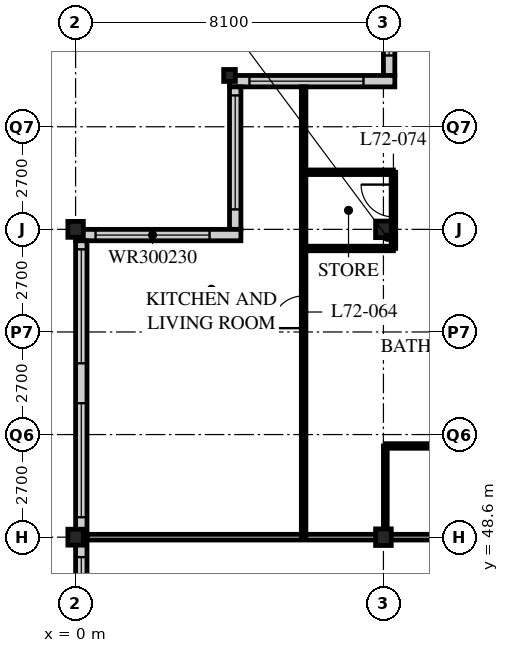
"""IFC4 building model, lengths in metres.
Left out: names, types, materials, properties, quantities, classifications, styles, units other than length and angle.
Written with IfcOpenShell. Run it as: python <this file> out.ifc"""

import sys

from ifc_helpers import new_model, si_unit, direction, frame, frame_2d, origin, origin_2d, place, context, subcontext, project, spatial, rectangle, i_section, extrude, element, fill, save


model = new_model("IFC4")
c1 = context("Model", 3, precision=1e-05, world=origin(), true_north=direction((0.0, 1.0)))
c2 = subcontext(c1, "Body", "Model", "MODEL_VIEW")
j1 = project(units=[si_unit("LENGTHUNIT", "METRE"), si_unit("PLANEANGLEUNIT", "RADIAN")], contexts=[c1])
p1 = place(None, origin())
s1 = spatial("IfcSite", under=j1, at=p1, CompositionType="ELEMENT")
p2 = place(p1, origin())
s2 = spatial("IfcBuilding", under=s1, at=p2, CompositionType="ELEMENT")
p3 = place(p2, frame((0.0, 0.0, 281.4)))
s3 = spatial("IfcBuildingStorey", under=s2, at=p3, CompositionType="ELEMENT", Elevation=281.4)
for number, where, z_axis, x_axis in (
    (1, (0.0, 48.6, 0.0), (0.0, 0.0, 1.0), (1.0, 0.0, 0.0)),
    (2, (0.0, 56.7, 0.0), (0.0, 0.0, 1.0), (1.0, 0.0, 0.0)),
):
    element("IfcColumn", number, at=place(p3, frame(where, z_axis=z_axis, x_axis=x_axis)), inside=s3, PredefinedType="COLUMN", context=c2, shape_type="SweptSolid", body=[
        extrude(i_section(OverallWidth=0.407, OverallDepth=0.419, WebThickness=0.031, FlangeThickness=0.049, FilletRadius=0.015, at=origin_2d()), origin(), (0.0, 0.0, 1.0), 3.9),
    ])
p4 = place(p3, frame((4.05, 60.75, 0.0), z_axis=(0.0, 0.0, 1.0), x_axis=(1.0, 0.0, 0.0)))
e3 = element("IfcColumn", 3, at=p4, inside=s3, PredefinedType="COLUMN", context=c2, shape_type="SweptSolid", body=[
    extrude(i_section(OverallWidth=0.307, OverallDepth=0.314, WebThickness=0.012, FlangeThickness=0.019, FilletRadius=0.015, at=origin_2d()), origin(), (0.0, 0.0, 1.0), 3.9),
])
for number, where, z_axis, x_axis in (
    (4, (8.1, 48.6, 0.0), (0.0, 0.0, 1.0), (1.0, 0.0, 0.0)),
    (5, (8.1, 56.7, 0.0), (0.0, 0.0, 1.0), (1.0, 0.0, 0.0)),
):
    element("IfcColumn", number, at=place(p3, frame(where, z_axis=z_axis, x_axis=x_axis)), inside=s3, PredefinedType="COLUMN", context=c2, shape_type="SweptSolid", body=[
        extrude(i_section(OverallWidth=0.412, OverallDepth=0.437, WebThickness=0.036, FlangeThickness=0.058, FilletRadius=0.015, at=origin_2d()), origin(), (0.0, 0.0, 1.0), 3.9),
    ])
p5 = place(p3, frame((8.25, 64.5, 0.0), z_axis=(0.0, 0.0, 1.0), x_axis=(0.0, -1.0, 0.0)))
e6 = element("IfcWall", 6, at=p5, inside=s3, PredefinedType="SOLIDWALL", context=c2, shape_type="SweptSolid", body=[
    extrude(rectangle(XDim=3.75, YDim=0.3, at=frame_2d((1.875, 0.0))), origin(), (0.0, 0.0, 1.0), 3.69),
])
p6 = place(p5, frame((0.225, 0.0, 0.6)))
e7 = element("IfcOpeningElement", 7, at=p6, cuts=e6, PredefinedType="OPENING", context=c2, shape_type="SweptSolid", body=[
    extrude(rectangle(XDim=3.0, YDim=2.3, at=frame_2d((1.5, 1.15))), frame((0.0, 0.16, 0.0), z_axis=(0.0, -1.0, 0.0), x_axis=(1.0, 0.0, 0.0)), (0.0, 0.0, 1.0), 0.32),
])
p7 = place(p3, frame((8.4, 60.6, 0.0), z_axis=(0.0, 0.0, 1.0), x_axis=(-1.0, 0.0, 0.0)))
e8 = element("IfcWall", 8, at=p7, inside=s3, PredefinedType="SOLIDWALL", context=c2, shape_type="SweptSolid", body=[
    extrude(rectangle(XDim=4.35, YDim=0.3, at=frame_2d((2.175, 0.0))), origin(), (0.0, 0.0, 1.0), 3.69),
])
p8 = place(p7, frame((0.825, 0.0, 0.6)))
e9 = element("IfcOpeningElement", 9, at=p8, cuts=e8, PredefinedType="OPENING", context=c2, shape_type="SweptSolid", body=[
    extrude(rectangle(XDim=3.0, YDim=2.3, at=frame_2d((1.5, 1.15))), frame((0.0, 0.16, 0.0), z_axis=(0.0, -1.0, 0.0), x_axis=(1.0, 0.0, 0.0)), (0.0, 0.0, 1.0), 0.32),
])
p9 = place(p3, frame((4.2, 60.45, 0.0), z_axis=(0.0, 0.0, 1.0), x_axis=(0.0, -1.0, 0.0)))
e10 = element("IfcWall", 10, at=p9, inside=s3, PredefinedType="SOLIDWALL", context=c2, shape_type="SweptSolid", body=[
    extrude(rectangle(XDim=3.75, YDim=0.3, at=frame_2d((1.875, 0.0))), origin(), (0.0, 0.0, 1.0), 3.69),
])
p10 = place(p9, frame((0.225, 0.0, 0.6)))
e11 = element("IfcOpeningElement", 11, at=p10, cuts=e10, PredefinedType="OPENING", context=c2, shape_type="SweptSolid", body=[
    extrude(rectangle(XDim=3.0, YDim=2.3, at=frame_2d((1.5, 1.15))), frame((0.0, 0.16, 0.0), z_axis=(0.0, -1.0, 0.0), x_axis=(1.0, 0.0, 0.0)), (0.0, 0.0, 1.0), 0.32),
])
p11 = place(p3, frame((4.35, 56.55, 0.0), z_axis=(0.0, 0.0, 1.0), x_axis=(-1.0, 0.0, 0.0)))
e12 = element("IfcWall", 12, at=p11, inside=s3, PredefinedType="SOLIDWALL", context=c2, shape_type="SweptSolid", body=[
    extrude(rectangle(XDim=4.35, YDim=0.3, at=frame_2d((2.175, 0.0))), origin(), (0.0, 0.0, 1.0), 3.69),
])
p12 = place(p11, frame((0.825, 0.0, 0.6)))
e13 = element("IfcOpeningElement", 13, at=p12, cuts=e12, PredefinedType="OPENING", context=c2, shape_type="SweptSolid", body=[
    extrude(rectangle(XDim=3.0, YDim=2.3, at=frame_2d((1.5, 1.15))), frame((0.0, 0.16, 0.0), z_axis=(0.0, -1.0, 0.0), x_axis=(1.0, 0.0, 0.0)), (0.0, 0.0, 1.0), 0.32),
])
p13 = place(p3, frame((0.15, 56.4, 0.0), z_axis=(0.0, 0.0, 1.0), x_axis=(0.0, -1.0, 0.0)))
e14 = element("IfcWall", 14, at=p13, inside=s3, PredefinedType="SOLIDWALL", context=c2, shape_type="SweptSolid", body=[
    extrude(rectangle(XDim=32.1, YDim=0.3, at=frame_2d((16.05, 0.0))), origin(), (0.0, 0.0, 1.0), 3.69),
])
p14 = place(p13, frame((0.225, 0.0, 0.6)))
e15 = element("IfcOpeningElement", 15, at=p14, cuts=e14, PredefinedType="OPENING", context=c2, shape_type="SweptSolid", body=[
    extrude(rectangle(XDim=3.0, YDim=2.4, at=frame_2d((1.5, 1.2))), frame((0.0, 0.16, 0.0), z_axis=(0.0, -1.0, 0.0), x_axis=(1.0, 0.0, 0.0)), (0.0, 0.0, 1.0), 0.32),
])
p15 = place(p13, frame((4.275, 0.0, 0.6)))
e16 = element("IfcOpeningElement", 16, at=p15, cuts=e14, PredefinedType="OPENING", context=c2, shape_type="SweptSolid", body=[
    extrude(rectangle(XDim=3.0, YDim=2.4, at=frame_2d((1.5, 1.2))), frame((0.0, 0.16, 0.0), z_axis=(0.0, -1.0, 0.0), x_axis=(1.0, 0.0, 0.0)), (0.0, 0.0, 1.0), 0.32),
])
p16 = place(p13, frame((8.325, 0.0, 0.6)))
e17 = element("IfcOpeningElement", 17, at=p16, cuts=e14, PredefinedType="OPENING", context=c2, shape_type="SweptSolid", body=[
    extrude(rectangle(XDim=3.0, YDim=2.4, at=frame_2d((1.5, 1.2))), frame((0.0, 0.16, 0.0), z_axis=(0.0, -1.0, 0.0), x_axis=(1.0, 0.0, 0.0)), (0.0, 0.0, 1.0), 0.32),
])
p17 = place(p13, frame((12.375, 0.0, 0.6)))
e18 = element("IfcOpeningElement", 18, at=p17, cuts=e14, PredefinedType="OPENING", context=c2, shape_type="SweptSolid", body=[
    extrude(rectangle(XDim=3.0, YDim=2.4, at=frame_2d((1.5, 1.2))), frame((0.0, 0.16, 0.0), z_axis=(0.0, -1.0, 0.0), x_axis=(1.0, 0.0, 0.0)), (0.0, 0.0, 1.0), 0.32),
])
p18 = place(p13, frame((16.425, 0.0, 0.6)))
e19 = element("IfcOpeningElement", 19, at=p18, cuts=e14, PredefinedType="OPENING", context=c2, shape_type="SweptSolid", body=[
    extrude(rectangle(XDim=3.0, YDim=2.4, at=frame_2d((1.5, 1.2))), frame((0.0, 0.16, 0.0), z_axis=(0.0, -1.0, 0.0), x_axis=(1.0, 0.0, 0.0)), (0.0, 0.0, 1.0), 0.32),
])
p19 = place(p13, frame((20.475, 0.0, 0.6)))
e20 = element("IfcOpeningElement", 20, at=p19, cuts=e14, PredefinedType="OPENING", context=c2, shape_type="SweptSolid", body=[
    extrude(rectangle(XDim=3.0, YDim=2.4, at=frame_2d((1.5, 1.2))), frame((0.0, 0.16, 0.0), z_axis=(0.0, -1.0, 0.0), x_axis=(1.0, 0.0, 0.0)), (0.0, 0.0, 1.0), 0.32),
])
p20 = place(p13, frame((24.525, 0.0, 0.6)))
e21 = element("IfcOpeningElement", 21, at=p20, cuts=e14, PredefinedType="OPENING", context=c2, shape_type="SweptSolid", body=[
    extrude(rectangle(XDim=3.0, YDim=2.4, at=frame_2d((1.5, 1.2))), frame((0.0, 0.16, 0.0), z_axis=(0.0, -1.0, 0.0), x_axis=(1.0, 0.0, 0.0)), (0.0, 0.0, 1.0), 0.32),
])
p21 = place(p13, frame((28.575, 0.0, 0.6)))
e22 = element("IfcOpeningElement", 22, at=p21, cuts=e14, PredefinedType="OPENING", context=c2, shape_type="SweptSolid", body=[
    extrude(rectangle(XDim=3.0, YDim=2.4, at=frame_2d((1.5, 1.2))), frame((0.0, 0.16, 0.0), z_axis=(0.0, -1.0, 0.0), x_axis=(1.0, 0.0, 0.0)), (0.0, 0.0, 1.0), 0.32),
])
p22 = place(p3, frame((8.15, 48.6, 0.0), z_axis=(0.0, 0.0, 1.0), x_axis=(0.0, 1.0, 0.0)))
e23 = element("IfcWall", 23, at=p22, inside=s3, PredefinedType="PARTITIONING", context=c2, shape_type="SweptSolid", body=[
    extrude(rectangle(XDim=2.4, YDim=0.1, at=frame_2d((1.2, 0.0))), origin(), (0.0, 0.0, 1.0), 3.078),
])
p23 = place(p3, frame((8.15, 51.0, 0.0), z_axis=(0.0, 0.0, 1.0), x_axis=(1.0, 0.0, 0.0)))
e24 = element("IfcWall", 24, at=p23, inside=s3, PredefinedType="PARTITIONING", context=c2, shape_type="SweptSolid", body=[
    extrude(rectangle(XDim=28.3, YDim=0.12, at=frame_2d((14.15, 0.0))), origin(), (0.0, 0.0, 1.0), 3.69),
])
p24 = place(p23, frame((9.025, 0.0, 0.0)))
e25 = element("IfcOpeningElement", 25, at=p24, cuts=e24, PredefinedType="OPENING", context=c2, shape_type="SweptSolid", body=[
    extrude(rectangle(XDim=0.85, YDim=2.1, at=frame_2d((0.425, 1.05))), frame((0.0, 0.07, 0.0), z_axis=(0.0, -1.0, 0.0), x_axis=(1.0, 0.0, 0.0)), (0.0, 0.0, 1.0), 0.14),
])
p25 = place(p23, frame((16.475, 0.0, 0.0)))
e26 = element("IfcOpeningElement", 26, at=p25, cuts=e24, PredefinedType="OPENING", context=c2, shape_type="SweptSolid", body=[
    extrude(rectangle(XDim=0.85, YDim=2.1, at=frame_2d((0.425, 1.05))), frame((0.0, 0.07, 0.0), z_axis=(0.0, -1.0, 0.0), x_axis=(1.0, 0.0, 0.0)), (0.0, 0.0, 1.0), 0.14),
])
p26 = place(p23, frame((21.175, 0.0, 0.0)))
e27 = element("IfcOpeningElement", 27, at=p26, cuts=e24, PredefinedType="OPENING", context=c2, shape_type="SweptSolid", body=[
    extrude(rectangle(XDim=0.85, YDim=2.1, at=frame_2d((0.425, 1.05))), frame((0.0, 0.07, 0.0), z_axis=(0.0, -1.0, 0.0), x_axis=(1.0, 0.0, 0.0)), (0.0, 0.0, 1.0), 0.14),
])
p27 = place(p23, frame((24.575, 0.0, 0.0)))
e28 = element("IfcOpeningElement", 28, at=p27, cuts=e24, PredefinedType="OPENING", context=c2, shape_type="SweptSolid", body=[
    extrude(rectangle(XDim=0.85, YDim=2.1, at=frame_2d((0.425, 1.05))), frame((0.0, 0.07, 0.0), z_axis=(0.0, -1.0, 0.0), x_axis=(1.0, 0.0, 0.0)), (0.0, 0.0, 1.0), 0.14),
])
p28 = place(p23, frame((6.725, 0.0, 0.0)))
e29 = element("IfcOpeningElement", 29, at=p28, cuts=e24, PredefinedType="OPENING", context=c2, shape_type="SweptSolid", body=[
    extrude(rectangle(XDim=0.85, YDim=2.1, at=frame_2d((0.425, 1.05))), frame((0.0, 0.07, 0.0), z_axis=(0.0, -1.0, 0.0), x_axis=(1.0, 0.0, 0.0)), (0.0, 0.0, 1.0), 0.14),
])
p29 = place(p23, frame((2.875, 0.0, 0.0)))
e30 = element("IfcOpeningElement", 30, at=p29, cuts=e24, PredefinedType="OPENING", context=c2, shape_type="SweptSolid", body=[
    extrude(rectangle(XDim=0.85, YDim=2.1, at=frame_2d((0.425, 1.05))), frame((0.0, 0.07, 0.0), z_axis=(0.0, -1.0, 0.0), x_axis=(1.0, 0.0, 0.0)), (0.0, 0.0, 1.0), 0.14),
])
p30 = place(p3, frame((0.3, 48.6, 0.0), z_axis=(0.0, 0.0, 1.0), x_axis=(1.0, 0.0, 0.0)))
e31 = element("IfcWall", 31, at=p30, inside=s3, PredefinedType="PARTITIONING", context=c2, shape_type="SweptSolid", body=[
    extrude(rectangle(XDim=11.85, YDim=0.15, at=frame_2d((5.925, 0.0))), origin(), (0.0, 0.0, 1.0), 3.078),
])
p31 = place(p3, frame((6.0, 48.6, 0.0), z_axis=(0.0, 0.0, 1.0), x_axis=(0.0, 1.0, 0.0)))
e32 = element("IfcWall", 32, at=p31, inside=s3, PredefinedType="PARTITIONING", context=c2, shape_type="SweptSolid", body=[
    extrude(rectangle(XDim=11.85, YDim=0.12, at=frame_2d((5.925, 0.0))), origin(), (0.0, 0.0, 1.0), 3.69),
])
p32 = place(p31, frame((5.5, 0.0, 0.0)))
e33 = element("IfcOpeningElement", 33, at=p32, cuts=e32, PredefinedType="OPENING", context=c2, shape_type="SweptSolid", body=[
    extrude(rectangle(XDim=0.85, YDim=2.1, at=frame_2d((0.425, 1.05))), frame((0.0, 0.07, 0.0), z_axis=(0.0, -1.0, 0.0), x_axis=(1.0, 0.0, 0.0)), (0.0, 0.0, 1.0), 0.14),
])
for number, where, z_axis, x_axis in (
    (34, (6.0, 56.197, 0.0), (0.0, 0.0, 1.0), (1.0, 0.0, 0.0)),
    (35, (6.0, 58.203, 0.0), (0.0, 0.0, 1.0), (1.0, 0.0, 0.0)),
):
    element("IfcWall", number, at=place(p3, frame(where, z_axis=z_axis, x_axis=x_axis)), inside=s3, PredefinedType="PARTITIONING", context=c2, shape_type="SweptSolid", body=[
        extrude(rectangle(XDim=2.363, YDim=0.12, at=frame_2d((1.182, 0.0))), origin(), (0.0, 0.0, 1.0), 3.69),
    ])
p33 = place(p3, frame((8.363, 56.197, 0.0), z_axis=(0.0, 0.0, 1.0), x_axis=(0.0, 1.0, 0.0)))
e36 = element("IfcWall", 36, at=p33, inside=s3, PredefinedType="PARTITIONING", context=c2, shape_type="SweptSolid", body=[
    extrude(rectangle(XDim=2.006, YDim=0.12, at=frame_2d((1.003, 0.0))), origin(), (0.0, 0.0, 1.0), 3.69),
])
p34 = place(p33, frame((0.831, 0.0, 0.0)))
e37 = element("IfcOpeningElement", 37, at=p34, cuts=e36, PredefinedType="OPENING", context=c2, shape_type="SweptSolid", body=[
    extrude(rectangle(XDim=0.85, YDim=2.1, at=frame_2d((0.425, 1.05))), frame((0.0, 0.07, 0.0), z_axis=(0.0, -1.0, 0.0), x_axis=(1.0, 0.0, 0.0)), (0.0, 0.0, 1.0), 0.14),
])
p35 = place(p6, origin())
e38 = element("IfcWindow", 38, at=p35, inside=s3, PartitioningType="SINGLE_PANEL", PredefinedType="WINDOW", context=c2, shape_type="SweptSolid", body=[
    extrude(rectangle(XDim=3.0, YDim=2.3, at=frame_2d((1.5, 1.15))), frame((0.0, 0.03, 0.0), z_axis=(0.0, -1.0, 0.0), x_axis=(1.0, 0.0, 0.0)), (0.0, 0.0, 1.0), 0.06),
])
fill(e7, e38)
p36 = place(p8, origin())
e39 = element("IfcWindow", 39, at=p36, inside=s3, PartitioningType="SINGLE_PANEL", PredefinedType="WINDOW", context=c2, shape_type="SweptSolid", body=[
    extrude(rectangle(XDim=3.0, YDim=2.3, at=frame_2d((1.5, 1.15))), frame((0.0, 0.03, 0.0), z_axis=(0.0, -1.0, 0.0), x_axis=(1.0, 0.0, 0.0)), (0.0, 0.0, 1.0), 0.06),
])
fill(e9, e39)
p37 = place(p10, origin())
e40 = element("IfcWindow", 40, at=p37, inside=s3, PartitioningType="SINGLE_PANEL", PredefinedType="WINDOW", context=c2, shape_type="SweptSolid", body=[
    extrude(rectangle(XDim=3.0, YDim=2.3, at=frame_2d((1.5, 1.15))), frame((0.0, 0.03, 0.0), z_axis=(0.0, -1.0, 0.0), x_axis=(1.0, 0.0, 0.0)), (0.0, 0.0, 1.0), 0.06),
])
fill(e11, e40)
p38 = place(p12, origin())
e41 = element("IfcWindow", 41, at=p38, inside=s3, PartitioningType="SINGLE_PANEL", PredefinedType="WINDOW", context=c2, shape_type="SweptSolid", body=[
    extrude(rectangle(XDim=3.0, YDim=2.3, at=frame_2d((1.5, 1.15))), frame((0.0, 0.03, 0.0), z_axis=(0.0, -1.0, 0.0), x_axis=(1.0, 0.0, 0.0)), (0.0, 0.0, 1.0), 0.06),
])
fill(e13, e41)
p39 = place(p14, origin())
e42 = element("IfcWindow", 42, at=p39, inside=s3, PartitioningType="SINGLE_PANEL", PredefinedType="WINDOW", context=c2, shape_type="SweptSolid", body=[
    extrude(rectangle(XDim=3.0, YDim=2.4, at=frame_2d((1.5, 1.2))), frame((0.0, 0.03, 0.0), z_axis=(0.0, -1.0, 0.0), x_axis=(1.0, 0.0, 0.0)), (0.0, 0.0, 1.0), 0.06),
])
fill(e15, e42)
p40 = place(p15, origin())
e43 = element("IfcWindow", 43, at=p40, inside=s3, PartitioningType="SINGLE_PANEL", PredefinedType="WINDOW", context=c2, shape_type="SweptSolid", body=[
    extrude(rectangle(XDim=3.0, YDim=2.4, at=frame_2d((1.5, 1.2))), frame((0.0, 0.03, 0.0), z_axis=(0.0, -1.0, 0.0), x_axis=(1.0, 0.0, 0.0)), (0.0, 0.0, 1.0), 0.06),
])
fill(e16, e43)
p41 = place(p16, origin())
e44 = element("IfcWindow", 44, at=p41, inside=s3, PartitioningType="SINGLE_PANEL", PredefinedType="WINDOW", context=c2, shape_type="SweptSolid", body=[
    extrude(rectangle(XDim=3.0, YDim=2.4, at=frame_2d((1.5, 1.2))), frame((0.0, 0.03, 0.0), z_axis=(0.0, -1.0, 0.0), x_axis=(1.0, 0.0, 0.0)), (0.0, 0.0, 1.0), 0.06),
])
fill(e17, e44)
p42 = place(p32, origin())
e45 = element("IfcDoor", 45, at=p42, inside=s3, OperationType="SINGLE_SWING_LEFT", PredefinedType="DOOR", context=c2, shape_type="SweptSolid", body=[
    extrude(rectangle(XDim=0.85, YDim=2.1, at=frame_2d((0.425, 1.05))), frame((0.0, 0.025, 0.0), z_axis=(0.0, -1.0, 0.0), x_axis=(1.0, 0.0, 0.0)), (0.0, 0.0, 1.0), 0.05),
])
fill(e33, e45)
p43 = place(p34, origin())
e46 = element("IfcDoor", 46, at=p43, inside=s3, OperationType="SINGLE_SWING_RIGHT", PredefinedType="DOOR", context=c2, shape_type="SweptSolid", body=[
    extrude(rectangle(XDim=0.85, YDim=2.1, at=frame_2d((0.425, 1.05))), frame((0.0, 0.025, 0.0), z_axis=(0.0, -1.0, 0.0), x_axis=(1.0, 0.0, 0.0)), (0.0, 0.0, 1.0), 0.05),
])
fill(e37, e46)
save(model, sys.argv[1])
